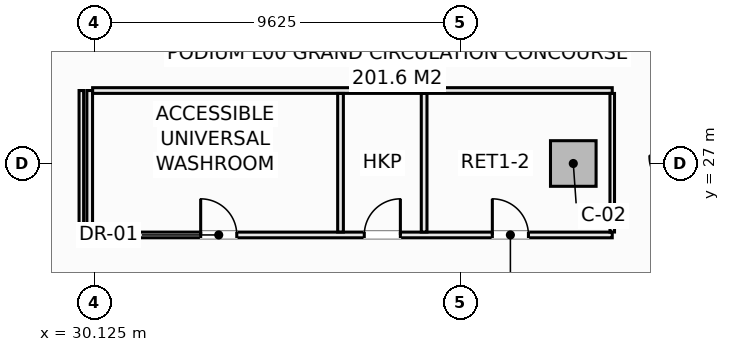
"""IFC4 building model, lengths in metres.
Left out: names, types, materials, properties, quantities, classifications, styles, units other than length and angle.
Written with IfcOpenShell. Run it as: python <this file> out.ifc"""

import sys

from ifc_helpers import new_model, si_unit, direction, frame, frame_2d, origin, origin_2d, place, context, subcontext, project, spatial, rectangle, extrude, element, fill, save


model = new_model("IFC4")
c1 = context("Model", 3, precision=1e-05, world=origin(), true_north=direction((0.0, 1.0)))
c2 = subcontext(c1, "Body", "Model", "MODEL_VIEW")
j1 = project(units=[si_unit("LENGTHUNIT", "METRE"), si_unit("PLANEANGLEUNIT", "RADIAN")], contexts=[c1])
p1 = place(None, origin())
s1 = spatial("IfcSite", under=j1, at=p1, CompositionType="ELEMENT")
p2 = place(p1, origin())
s2 = spatial("IfcBuilding", under=s1, at=p2, CompositionType="ELEMENT")
p3 = place(p2, origin())
s3 = spatial("IfcBuildingStorey", under=s2, at=p3, CompositionType="ELEMENT", Elevation=0.0)
p4 = place(p3, frame((42.725, 27.0, -0.36), z_axis=(0.0, 0.0, 1.0), x_axis=(1.0, 0.0, 0.0)))
e1 = element("IfcColumn", 1, at=p4, inside=s3, PredefinedType="COLUMN", context=c2, shape_type="SweptSolid", body=[
    extrude(rectangle(XDim=1.2, YDim=1.2, at=origin_2d()), origin(), (0.0, 0.0, 1.0), 5.1),
])
p5 = place(p3, frame((29.78, 25.12, 0.0), z_axis=(0.0, 0.0, 1.0), x_axis=(1.0, 0.0, 0.0)))
e2 = element("IfcWall", 2, at=p5, inside=s3, PredefinedType="PARTITIONING", context=c2, shape_type="SweptSolid", body=[
    extrude(rectangle(XDim=13.97, YDim=0.15, at=frame_2d((6.985, 0.0))), origin(), (0.0, 0.0, 1.0), 4.74),
])
p6 = place(p5, frame((3.14, 0.0, 0.0)))
e3 = element("IfcOpeningElement", 3, at=p6, cuts=e2, PredefinedType="OPENING", context=c2, shape_type="SweptSolid", body=[
    extrude(rectangle(XDim=0.95, YDim=2.1, at=frame_2d((0.475, 1.05))), frame((0.0, 0.085, 0.0), z_axis=(0.0, -1.0, 0.0), x_axis=(1.0, 0.0, 0.0)), (0.0, 0.0, 1.0), 0.17),
])
p7 = place(p5, frame((7.445, 0.0, 0.0)))
e4 = element("IfcOpeningElement", 4, at=p7, cuts=e2, PredefinedType="OPENING", context=c2, shape_type="SweptSolid", body=[
    extrude(rectangle(XDim=0.95, YDim=2.1, at=frame_2d((0.475, 1.05))), frame((0.0, 0.085, 0.0), z_axis=(0.0, -1.0, 0.0), x_axis=(1.0, 0.0, 0.0)), (0.0, 0.0, 1.0), 0.17),
])
p8 = place(p5, frame((10.815, 0.0, 0.0)))
e5 = element("IfcOpeningElement", 5, at=p8, cuts=e2, PredefinedType="OPENING", context=c2, shape_type="SweptSolid", body=[
    extrude(rectangle(XDim=0.95, YDim=2.1, at=frame_2d((0.475, 1.05))), frame((0.0, 0.085, 0.0), z_axis=(0.0, -1.0, 0.0), x_axis=(1.0, 0.0, 0.0)), (0.0, 0.0, 1.0), 0.17),
])
p9 = place(p3, frame((30.0, 25.197, 0.0), z_axis=(0.0, 0.0, 1.0), x_axis=(0.0, 1.0, 0.0)))
e6 = element("IfcWall", 6, at=p9, inside=s3, PredefinedType="PARTITIONING", context=c2, shape_type="SweptSolid", body=[
    extrude(rectangle(XDim=3.723, YDim=0.15, at=frame_2d((1.861, 0.0))), origin(), (0.0, 0.0, 1.0), 4.74),
])
p10 = place(p3, frame((30.077, 28.92, 0.0), z_axis=(0.0, 0.0, 1.0), x_axis=(1.0, 0.0, 0.0)))
e7 = element("IfcWall", 7, at=p10, inside=s3, PredefinedType="PARTITIONING", context=c2, shape_type="SweptSolid", body=[
    extrude(rectangle(XDim=13.673, YDim=0.15, at=frame_2d((6.836, 0.0))), origin(), (0.0, 0.0, 1.0), 4.74),
])
for number, where, z_axis, x_axis in (
    (8, (36.6, 25.197, 0.0), (0.0, 0.0, 1.0), (0.0, 1.0, 0.0)),
    (9, (38.8, 25.197, 0.0), (0.0, 0.0, 1.0), (0.0, 1.0, 0.0)),
):
    element("IfcWall", number, at=place(p3, frame(where, z_axis=z_axis, x_axis=x_axis)), inside=s3, PredefinedType="PARTITIONING", context=c2, shape_type="SweptSolid", body=[
        extrude(rectangle(XDim=3.646, YDim=0.15, at=frame_2d((1.823, 0.0))), origin(), (0.0, 0.0, 1.0), 4.74),
    ])
p11 = place(p3, frame((29.78, 25.197, 0.0), z_axis=(0.0, 0.0, 1.0), x_axis=(0.0, 1.0, 0.0)))
e10 = element("IfcWall", 10, at=p11, inside=s3, PredefinedType="PARTITIONING", context=c2, shape_type="SweptSolid", body=[
    extrude(rectangle(XDim=3.723, YDim=0.12, at=frame_2d((1.861, 0.0))), origin(), (0.0, 0.0, 1.0), 4.74),
])
p12 = place(p3, frame((43.75, 25.197, 0.0), z_axis=(0.0, 0.0, 1.0), x_axis=(0.0, 1.0, 0.0)))
e11 = element("IfcWall", 11, at=p12, inside=s3, PredefinedType="PARTITIONING", context=c2, shape_type="SweptSolid", body=[
    extrude(rectangle(XDim=3.646, YDim=0.12, at=frame_2d((1.823, 0.0))), origin(), (0.0, 0.0, 1.0), 4.74),
])
p13 = place(p6, origin())
e12 = element("IfcDoor", 12, at=p13, inside=s3, OperationType="SINGLE_SWING_LEFT", PredefinedType="DOOR", context=c2, shape_type="SweptSolid", body=[
    extrude(rectangle(XDim=0.95, YDim=2.1, at=frame_2d((0.475, 1.05))), frame((0.0, 0.025, 0.0), z_axis=(0.0, -1.0, 0.0), x_axis=(1.0, 0.0, 0.0)), (0.0, 0.0, 1.0), 0.05),
])
fill(e3, e12)
p14 = place(p7, origin())
e13 = element("IfcDoor", 13, at=p14, inside=s3, OperationType="SINGLE_SWING_RIGHT", PredefinedType="DOOR", context=c2, shape_type="SweptSolid", body=[
    extrude(rectangle(XDim=0.95, YDim=2.1, at=frame_2d((0.475, 1.05))), frame((0.0, 0.025, 0.0), z_axis=(0.0, -1.0, 0.0), x_axis=(1.0, 0.0, 0.0)), (0.0, 0.0, 1.0), 0.05),
])
fill(e4, e13)
p15 = place(p8, origin())
e14 = element("IfcDoor", 14, at=p15, inside=s3, OperationType="SINGLE_SWING_LEFT", PredefinedType="DOOR", context=c2, shape_type="SweptSolid", body=[
    extrude(rectangle(XDim=0.95, YDim=2.1, at=frame_2d((0.475, 1.05))), frame((0.0, 0.025, 0.0), z_axis=(0.0, -1.0, 0.0), x_axis=(1.0, 0.0, 0.0)), (0.0, 0.0, 1.0), 0.05),
])
fill(e5, e14)
save(model, sys.argv[1])
